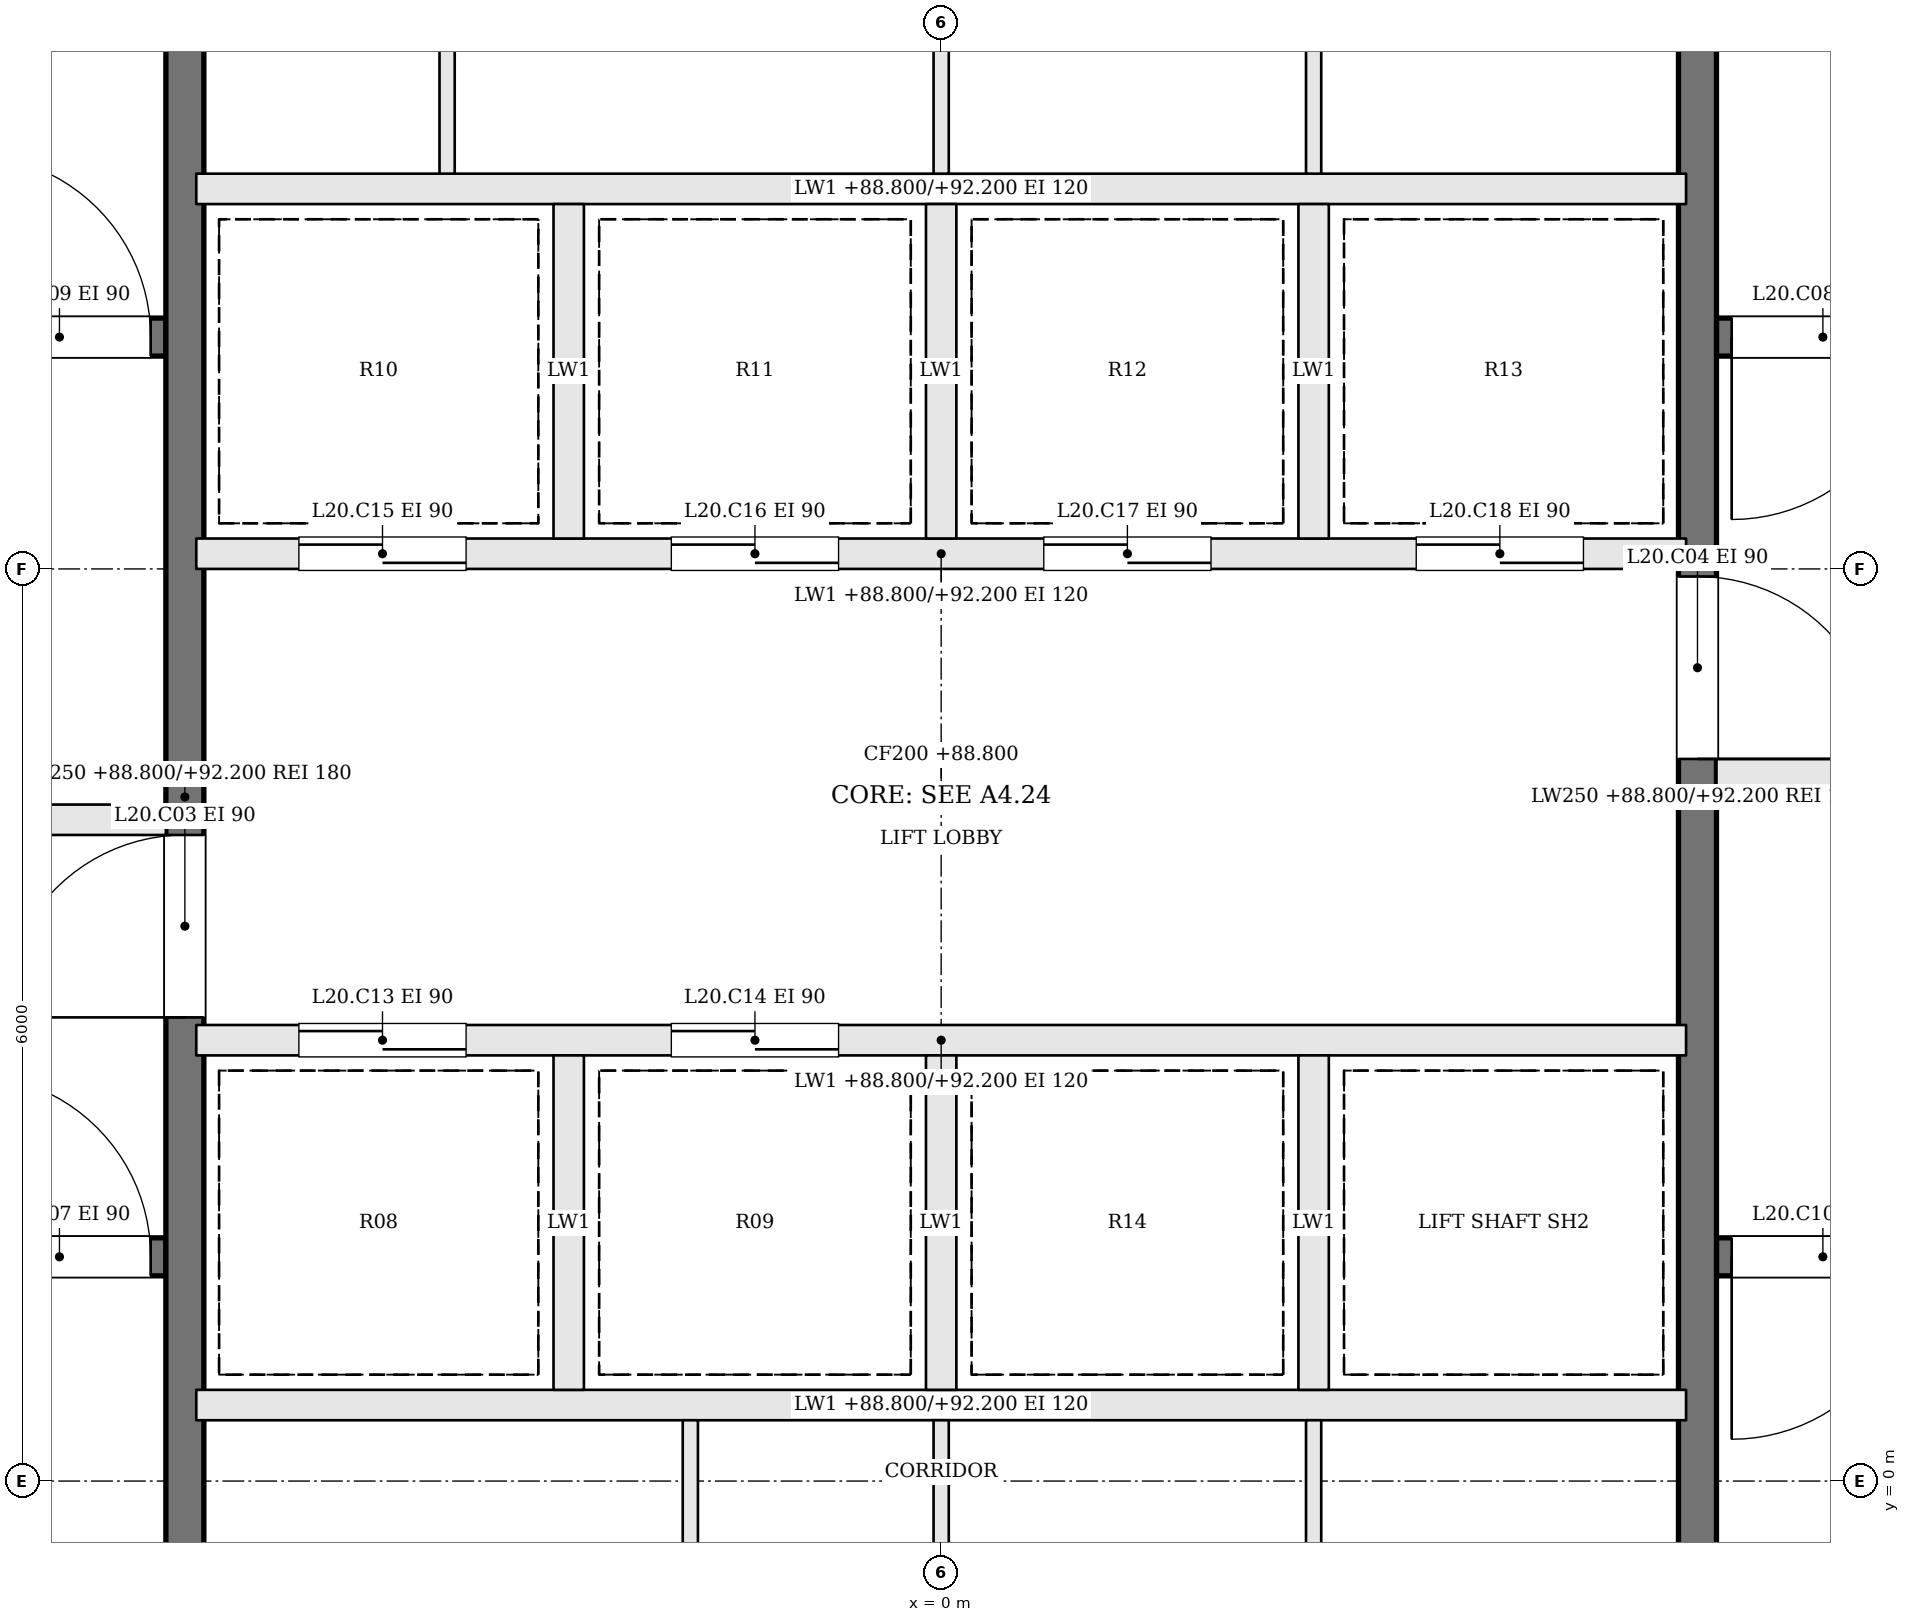
"""IFC4 building model, lengths in metres.
Left out: names, types, materials, properties, quantities, classifications, styles, units other than length and angle.
Written with IfcOpenShell. Run it as: python <this file> out.ifc"""

import sys

from ifc_helpers import new_model, si_unit, direction, frame, frame_2d, origin, place, context, subcontext, project, spatial, rectangle, extrude, element, fill, save


model = new_model("IFC4")
c1 = context("Model", 3, precision=1e-05, world=origin(), true_north=direction((0.0, 1.0)))
c2 = subcontext(c1, "Body", "Model", "MODEL_VIEW")
j1 = project(units=[si_unit("LENGTHUNIT", "METRE"), si_unit("PLANEANGLEUNIT", "RADIAN")], contexts=[c1])
p1 = place(None, origin())
s1 = spatial("IfcSite", under=j1, at=p1, CompositionType="ELEMENT")
p2 = place(p1, origin())
s2 = spatial("IfcBuilding", under=s1, at=p2, CompositionType="ELEMENT")
p3 = place(p2, frame((0.0, 0.0, 88.8)))
s3 = spatial("IfcBuildingStorey", under=s2, at=p3, CompositionType="ELEMENT", Elevation=88.8)
p4 = place(p3, frame((-11.9, 1.475, 0.0), z_axis=(0.0, 0.0, 1.0), x_axis=(1.0, 0.0, 0.0)))
e1 = element("IfcWall", 1, at=p4, inside=s3, PredefinedType="SOLIDWALL", context=c2, shape_type="SweptSolid", body=[
    extrude(rectangle(XDim=6.8, YDim=0.25, at=frame_2d((3.4, 0.0))), origin(), (0.0, 0.0, 1.0), 3.4),
])
p5 = place(p4, frame((5.5, 0.0, 0.0)))
e2 = element("IfcOpeningElement", 2, at=p5, cuts=e1, PredefinedType="OPENING", context=c2, shape_type="SweptSolid", body=[
    extrude(rectangle(XDim=1.2, YDim=2.1, at=frame_2d((0.6, 1.05))), frame((0.0, 0.135, 0.0), z_axis=(0.0, -1.0, 0.0), x_axis=(1.0, 0.0, 0.0)), (0.0, 0.0, 1.0), 0.27),
])
p6 = place(p3, frame((11.9, 7.525, 0.0), z_axis=(0.0, 0.0, 1.0), x_axis=(-1.0, 0.0, 0.0)))
e3 = element("IfcWall", 3, at=p6, inside=s3, PredefinedType="SOLIDWALL", context=c2, shape_type="SweptSolid", body=[
    extrude(rectangle(XDim=6.8, YDim=0.25, at=frame_2d((3.4, 0.0))), origin(), (0.0, 0.0, 1.0), 3.4),
])
p7 = place(p6, frame((5.5, 0.0, 0.0)))
e4 = element("IfcOpeningElement", 4, at=p7, cuts=e3, PredefinedType="OPENING", context=c2, shape_type="SweptSolid", body=[
    extrude(rectangle(XDim=1.2, YDim=2.1, at=frame_2d((0.6, 1.05))), frame((0.0, 0.135, 0.0), z_axis=(0.0, -1.0, 0.0), x_axis=(1.0, 0.0, 0.0)), (0.0, 0.0, 1.0), 0.27),
])
p8 = place(p3, frame((-11.9, 4.35, 0.0), z_axis=(0.0, 0.0, 1.0), x_axis=(1.0, 0.0, 0.0)))
e5 = element("IfcWall", 5, at=p8, inside=s3, PredefinedType="SOLIDWALL", context=c2, shape_type="SweptSolid", body=[
    extrude(rectangle(XDim=6.8, YDim=0.2, at=frame_2d((3.4, 0.0))), origin(), (0.0, 0.0, 1.0), 3.4),
])
p9 = place(p8, frame((4.1, 0.0, 0.0)))
e6 = element("IfcOpeningElement", 6, at=p9, cuts=e5, PredefinedType="OPENING", context=c2, shape_type="SweptSolid", body=[
    extrude(rectangle(XDim=1.2, YDim=2.1, at=frame_2d((0.6, 1.05))), frame((0.0, 0.11, 0.0), z_axis=(0.0, -1.0, 0.0), x_axis=(1.0, 0.0, 0.0)), (0.0, 0.0, 1.0), 0.22),
])
p10 = place(p8, frame((0.8, 0.0, 0.0)))
e7 = element("IfcOpeningElement", 7, at=p10, cuts=e5, PredefinedType="OPENING", context=c2, shape_type="SweptSolid", body=[
    extrude(rectangle(XDim=1.2, YDim=2.1, at=frame_2d((0.6, 1.05))), frame((0.0, 0.11, 0.0), z_axis=(0.0, -1.0, 0.0), x_axis=(1.0, 0.0, 0.0)), (0.0, 0.0, 1.0), 0.22),
])
p11 = place(p3, frame((11.9, 4.65, 0.0), z_axis=(0.0, 0.0, 1.0), x_axis=(-1.0, 0.0, 0.0)))
e8 = element("IfcWall", 8, at=p11, inside=s3, PredefinedType="SOLIDWALL", context=c2, shape_type="SweptSolid", body=[
    extrude(rectangle(XDim=6.8, YDim=0.2, at=frame_2d((3.4, 0.0))), origin(), (0.0, 0.0, 1.0), 3.4),
])
p12 = place(p11, frame((4.1, 0.0, 0.0)))
e9 = element("IfcOpeningElement", 9, at=p12, cuts=e8, PredefinedType="OPENING", context=c2, shape_type="SweptSolid", body=[
    extrude(rectangle(XDim=1.2, YDim=2.1, at=frame_2d((0.6, 1.05))), frame((0.0, 0.11, 0.0), z_axis=(0.0, -1.0, 0.0), x_axis=(1.0, 0.0, 0.0)), (0.0, 0.0, 1.0), 0.22),
])
p13 = place(p11, frame((0.8, 0.0, 0.0)))
e10 = element("IfcOpeningElement", 10, at=p13, cuts=e8, PredefinedType="OPENING", context=c2, shape_type="SweptSolid", body=[
    extrude(rectangle(XDim=1.2, YDim=2.1, at=frame_2d((0.6, 1.05))), frame((0.0, 0.11, 0.0), z_axis=(0.0, -1.0, 0.0), x_axis=(1.0, 0.0, 0.0)), (0.0, 0.0, 1.0), 0.22),
])
p14 = place(p3, frame((-11.9, 7.525, 0.0), z_axis=(0.0, 0.0, 1.0), x_axis=(1.0, 0.0, 0.0)))
e11 = element("IfcWall", 11, at=p14, inside=s3, PredefinedType="SOLIDWALL", context=c2, shape_type="SweptSolid", body=[
    extrude(rectangle(XDim=6.8, YDim=0.25, at=frame_2d((3.4, 0.0))), origin(), (0.0, 0.0, 1.0), 3.4),
])
p15 = place(p14, frame((5.5, 0.0, 0.0)))
e12 = element("IfcOpeningElement", 12, at=p15, cuts=e11, PredefinedType="OPENING", context=c2, shape_type="SweptSolid", body=[
    extrude(rectangle(XDim=1.2, YDim=2.1, at=frame_2d((0.6, 1.05))), frame((0.0, 0.135, 0.0), z_axis=(0.0, -1.0, 0.0), x_axis=(1.0, 0.0, 0.0)), (0.0, 0.0, 1.0), 0.27),
])
p16 = place(p3, frame((11.9, 1.475, 0.0), z_axis=(0.0, 0.0, 1.0), x_axis=(-1.0, 0.0, 0.0)))
e13 = element("IfcWall", 13, at=p16, inside=s3, PredefinedType="SOLIDWALL", context=c2, shape_type="SweptSolid", body=[
    extrude(rectangle(XDim=6.8, YDim=0.25, at=frame_2d((3.4, 0.0))), origin(), (0.0, 0.0, 1.0), 3.4),
])
p17 = place(p16, frame((5.5, 0.0, 0.0)))
e14 = element("IfcOpeningElement", 14, at=p17, cuts=e13, PredefinedType="OPENING", context=c2, shape_type="SweptSolid", body=[
    extrude(rectangle(XDim=1.2, YDim=2.1, at=frame_2d((0.6, 1.05))), frame((0.0, 0.135, 0.0), z_axis=(0.0, -1.0, 0.0), x_axis=(1.0, 0.0, 0.0)), (0.0, 0.0, 1.0), 0.27),
])
p18 = place(p3, frame((-4.975, -1.9, 0.0), z_axis=(0.0, 0.0, 1.0), x_axis=(0.0, 1.0, 0.0)))
e15 = element("IfcWall", 15, at=p18, inside=s3, PredefinedType="SOLIDWALL", context=c2, shape_type="SweptSolid", body=[
    extrude(rectangle(XDim=12.8, YDim=0.25, at=frame_2d((6.4, 0.0))), origin(), (0.0, 0.0, 1.0), 3.4),
])
p19 = place(p18, frame((4.95, 0.0, 0.0)))
e16 = element("IfcOpeningElement", 16, at=p19, cuts=e15, PredefinedType="OPENING", context=c2, shape_type="SweptSolid", body=[
    extrude(rectangle(XDim=1.2, YDim=2.1, at=frame_2d((0.6, 1.05))), frame((0.0, 0.135, 0.0), z_axis=(0.0, -1.0, 0.0), x_axis=(1.0, 0.0, 0.0)), (0.0, 0.0, 1.0), 0.27),
])
p20 = place(p3, frame((4.975, 10.9, 0.0), z_axis=(0.0, 0.0, 1.0), x_axis=(0.0, -1.0, 0.0)))
e17 = element("IfcWall", 17, at=p20, inside=s3, PredefinedType="SOLIDWALL", context=c2, shape_type="SweptSolid", body=[
    extrude(rectangle(XDim=12.8, YDim=0.25, at=frame_2d((6.4, 0.0))), origin(), (0.0, 0.0, 1.0), 3.4),
])
p21 = place(p20, frame((4.95, 0.0, 0.0)))
e18 = element("IfcOpeningElement", 18, at=p21, cuts=e17, PredefinedType="OPENING", context=c2, shape_type="SweptSolid", body=[
    extrude(rectangle(XDim=1.2, YDim=2.1, at=frame_2d((0.6, 1.05))), frame((0.0, 0.135, 0.0), z_axis=(0.0, -1.0, 0.0), x_axis=(1.0, 0.0, 0.0)), (0.0, 0.0, 1.0), 0.27),
])
p22 = place(p3, frame((-4.9, 0.5, 0.0), z_axis=(0.0, 0.0, 1.0), x_axis=(1.0, 0.0, 0.0)))
e19 = element("IfcWall", 19, at=p22, inside=s3, PredefinedType="SOLIDWALL", context=c2, shape_type="SweptSolid", body=[
    extrude(rectangle(XDim=9.8, YDim=0.2, at=frame_2d((4.9, 0.0))), origin(), (0.0, 0.0, 1.0), 3.4),
])
p23 = place(p3, frame((-4.9, 2.9, 0.0), z_axis=(0.0, 0.0, 1.0), x_axis=(1.0, 0.0, 0.0)))
e20 = element("IfcWall", 20, at=p23, inside=s3, PredefinedType="SOLIDWALL", context=c2, shape_type="SweptSolid", body=[
    extrude(rectangle(XDim=9.8, YDim=0.2, at=frame_2d((4.9, 0.0))), origin(), (0.0, 0.0, 1.0), 3.4),
])
p24 = place(p23, frame((0.675, 0.0, 0.0)))
e21 = element("IfcOpeningElement", 21, at=p24, cuts=e20, PredefinedType="OPENING", context=c2, shape_type="SweptSolid", body=[
    extrude(rectangle(XDim=1.1, YDim=2.1, at=frame_2d((0.55, 1.05))), frame((0.0, 0.11, 0.0), z_axis=(0.0, -1.0, 0.0), x_axis=(1.0, 0.0, 0.0)), (0.0, 0.0, 1.0), 0.22),
])
p25 = place(p23, frame((3.125, 0.0, 0.0)))
e22 = element("IfcOpeningElement", 22, at=p25, cuts=e20, PredefinedType="OPENING", context=c2, shape_type="SweptSolid", body=[
    extrude(rectangle(XDim=1.1, YDim=2.1, at=frame_2d((0.55, 1.05))), frame((0.0, 0.11, 0.0), z_axis=(0.0, -1.0, 0.0), x_axis=(1.0, 0.0, 0.0)), (0.0, 0.0, 1.0), 0.22),
])
p26 = place(p3, frame((-4.9, 6.1, 0.0), z_axis=(0.0, 0.0, 1.0), x_axis=(1.0, 0.0, 0.0)))
e23 = element("IfcWall", 23, at=p26, inside=s3, PredefinedType="SOLIDWALL", context=c2, shape_type="SweptSolid", body=[
    extrude(rectangle(XDim=9.8, YDim=0.2, at=frame_2d((4.9, 0.0))), origin(), (0.0, 0.0, 1.0), 3.4),
])
p27 = place(p26, frame((0.675, 0.0, 0.0)))
e24 = element("IfcOpeningElement", 24, at=p27, cuts=e23, PredefinedType="OPENING", context=c2, shape_type="SweptSolid", body=[
    extrude(rectangle(XDim=1.1, YDim=2.1, at=frame_2d((0.55, 1.05))), frame((0.0, 0.11, 0.0), z_axis=(0.0, -1.0, 0.0), x_axis=(1.0, 0.0, 0.0)), (0.0, 0.0, 1.0), 0.22),
])
p28 = place(p26, frame((3.125, 0.0, 0.0)))
e25 = element("IfcOpeningElement", 25, at=p28, cuts=e23, PredefinedType="OPENING", context=c2, shape_type="SweptSolid", body=[
    extrude(rectangle(XDim=1.1, YDim=2.1, at=frame_2d((0.55, 1.05))), frame((0.0, 0.11, 0.0), z_axis=(0.0, -1.0, 0.0), x_axis=(1.0, 0.0, 0.0)), (0.0, 0.0, 1.0), 0.22),
])
p29 = place(p26, frame((5.575, 0.0, 0.0)))
e26 = element("IfcOpeningElement", 26, at=p29, cuts=e23, PredefinedType="OPENING", context=c2, shape_type="SweptSolid", body=[
    extrude(rectangle(XDim=1.1, YDim=2.1, at=frame_2d((0.55, 1.05))), frame((0.0, 0.11, 0.0), z_axis=(0.0, -1.0, 0.0), x_axis=(1.0, 0.0, 0.0)), (0.0, 0.0, 1.0), 0.22),
])
p30 = place(p26, frame((8.025, 0.0, 0.0)))
e27 = element("IfcOpeningElement", 27, at=p30, cuts=e23, PredefinedType="OPENING", context=c2, shape_type="SweptSolid", body=[
    extrude(rectangle(XDim=1.1, YDim=2.1, at=frame_2d((0.55, 1.05))), frame((0.0, 0.11, 0.0), z_axis=(0.0, -1.0, 0.0), x_axis=(1.0, 0.0, 0.0)), (0.0, 0.0, 1.0), 0.22),
])
p31 = place(p3, frame((-4.9, 8.5, 0.0), z_axis=(0.0, 0.0, 1.0), x_axis=(1.0, 0.0, 0.0)))
e28 = element("IfcWall", 28, at=p31, inside=s3, PredefinedType="SOLIDWALL", context=c2, shape_type="SweptSolid", body=[
    extrude(rectangle(XDim=9.8, YDim=0.2, at=frame_2d((4.9, 0.0))), origin(), (0.0, 0.0, 1.0), 3.4),
])
for number, where, z_axis, x_axis in (
    (29, (-2.45, 0.6, 0.0), (0.0, 0.0, 1.0), (0.0, 1.0, 0.0)),
    (30, (0.0, 0.6, 0.0), (0.0, 0.0, 1.0), (0.0, 1.0, 0.0)),
    (31, (2.45, 0.6, 0.0), (0.0, 0.0, 1.0), (0.0, 1.0, 0.0)),
    (32, (-2.45, 6.2, 0.0), (0.0, 0.0, 1.0), (0.0, 1.0, 0.0)),
    (33, (0.0, 6.2, 0.0), (0.0, 0.0, 1.0), (0.0, 1.0, 0.0)),
    (34, (2.45, 6.2, 0.0), (0.0, 0.0, 1.0), (0.0, 1.0, 0.0)),
):
    element("IfcWall", number, at=place(p3, frame(where, z_axis=z_axis, x_axis=x_axis)), inside=s3, PredefinedType="SOLIDWALL", context=c2, shape_type="SweptSolid", body=[
        extrude(rectangle(XDim=2.2, YDim=0.2, at=frame_2d((1.1, 0.0))), origin(), (0.0, 0.0, 1.0), 3.4),
    ])
for number, where, z_axis, x_axis in (
    (35, (-1.65, -1.9, 0.0), (0.0, 0.0, 1.0), (0.0, 1.0, 0.0)),
    (36, (0.0, -1.9, 0.0), (0.0, 0.0, 1.0), (0.0, 1.0, 0.0)),
    (37, (2.45, -1.9, 0.0), (0.0, 0.0, 1.0), (0.0, 1.0, 0.0)),
    (38, (-3.25, 8.6, 0.0), (0.0, 0.0, 1.0), (0.0, 1.0, 0.0)),
    (39, (0.0, 8.6, 0.0), (0.0, 0.0, 1.0), (0.0, 1.0, 0.0)),
    (40, (2.45, 8.6, 0.0), (0.0, 0.0, 1.0), (0.0, 1.0, 0.0)),
):
    element("IfcWall", number, at=place(p3, frame(where, z_axis=z_axis, x_axis=x_axis)), inside=s3, PredefinedType="PARTITIONING", context=c2, shape_type="SweptSolid", body=[
        extrude(rectangle(XDim=2.3, YDim=0.1, at=frame_2d((1.15, 0.0))), origin(), (0.0, 0.0, 1.0), 3.4),
    ])
p32 = place(p19, origin())
e41 = element("IfcDoor", 41, at=p32, inside=s3, OperationType="SINGLE_SWING_LEFT", PredefinedType="DOOR", context=c2, shape_type="SweptSolid", body=[
    extrude(rectangle(XDim=1.2, YDim=2.1, at=frame_2d((0.6, 1.05))), frame((0.0, 0.025, 0.0), z_axis=(0.0, -1.0, 0.0), x_axis=(1.0, 0.0, 0.0)), (0.0, 0.0, 1.0), 0.05),
])
fill(e16, e41)
p33 = place(p21, origin())
e42 = element("IfcDoor", 42, at=p33, inside=s3, OperationType="SINGLE_SWING_RIGHT", PredefinedType="DOOR", context=c2, shape_type="SweptSolid", body=[
    extrude(rectangle(XDim=1.2, YDim=2.1, at=frame_2d((0.6, 1.05))), frame((0.0, 0.025, 0.0), z_axis=(0.0, -1.0, 0.0), x_axis=(1.0, 0.0, 0.0)), (0.0, 0.0, 1.0), 0.05),
])
fill(e18, e42)
p34 = place(p5, origin())
e43 = element("IfcDoor", 43, at=p34, inside=s3, OperationType="SINGLE_SWING_LEFT", PredefinedType="DOOR", context=c2, shape_type="SweptSolid", body=[
    extrude(rectangle(XDim=1.2, YDim=2.1, at=frame_2d((0.6, 1.05))), frame((0.0, 0.025, 0.0), z_axis=(0.0, -1.0, 0.0), x_axis=(1.0, 0.0, 0.0)), (0.0, 0.0, 1.0), 0.05),
])
fill(e2, e43)
p35 = place(p7, origin())
e44 = element("IfcDoor", 44, at=p35, inside=s3, OperationType="SINGLE_SWING_RIGHT", PredefinedType="DOOR", context=c2, shape_type="SweptSolid", body=[
    extrude(rectangle(XDim=1.2, YDim=2.1, at=frame_2d((0.6, 1.05))), frame((0.0, 0.025, 0.0), z_axis=(0.0, -1.0, 0.0), x_axis=(1.0, 0.0, 0.0)), (0.0, 0.0, 1.0), 0.05),
])
fill(e4, e44)
p36 = place(p15, origin())
e45 = element("IfcDoor", 45, at=p36, inside=s3, OperationType="SINGLE_SWING_LEFT", PredefinedType="DOOR", context=c2, shape_type="SweptSolid", body=[
    extrude(rectangle(XDim=1.2, YDim=2.1, at=frame_2d((0.6, 1.05))), frame((0.0, 0.025, 0.0), z_axis=(0.0, -1.0, 0.0), x_axis=(1.0, 0.0, 0.0)), (0.0, 0.0, 1.0), 0.05),
])
fill(e12, e45)
p37 = place(p17, origin())
e46 = element("IfcDoor", 46, at=p37, inside=s3, OperationType="SINGLE_SWING_RIGHT", PredefinedType="DOOR", context=c2, shape_type="SweptSolid", body=[
    extrude(rectangle(XDim=1.2, YDim=2.1, at=frame_2d((0.6, 1.05))), frame((0.0, 0.025, 0.0), z_axis=(0.0, -1.0, 0.0), x_axis=(1.0, 0.0, 0.0)), (0.0, 0.0, 1.0), 0.05),
])
fill(e14, e46)
p38 = place(p24, origin())
e47 = element("IfcDoor", 47, at=p38, inside=s3, OperationType="SLIDING_TO_RIGHT", PredefinedType="DOOR", context=c2, shape_type="SweptSolid", body=[
    extrude(rectangle(XDim=1.1, YDim=2.1, at=frame_2d((0.55, 1.05))), frame((0.0, 0.025, 0.0), z_axis=(0.0, -1.0, 0.0), x_axis=(1.0, 0.0, 0.0)), (0.0, 0.0, 1.0), 0.05),
])
fill(e21, e47)
p39 = place(p25, origin())
e48 = element("IfcDoor", 48, at=p39, inside=s3, OperationType="SLIDING_TO_LEFT", PredefinedType="DOOR", context=c2, shape_type="SweptSolid", body=[
    extrude(rectangle(XDim=1.1, YDim=2.1, at=frame_2d((0.55, 1.05))), frame((0.0, 0.025, 0.0), z_axis=(0.0, -1.0, 0.0), x_axis=(1.0, 0.0, 0.0)), (0.0, 0.0, 1.0), 0.05),
])
fill(e22, e48)
p40 = place(p27, origin())
e49 = element("IfcDoor", 49, at=p40, inside=s3, OperationType="SLIDING_TO_RIGHT", PredefinedType="DOOR", context=c2, shape_type="SweptSolid", body=[
    extrude(rectangle(XDim=1.1, YDim=2.1, at=frame_2d((0.55, 1.05))), frame((0.0, 0.025, 0.0), z_axis=(0.0, -1.0, 0.0), x_axis=(1.0, 0.0, 0.0)), (0.0, 0.0, 1.0), 0.05),
])
fill(e24, e49)
p41 = place(p28, origin())
e50 = element("IfcDoor", 50, at=p41, inside=s3, OperationType="SLIDING_TO_LEFT", PredefinedType="DOOR", context=c2, shape_type="SweptSolid", body=[
    extrude(rectangle(XDim=1.1, YDim=2.1, at=frame_2d((0.55, 1.05))), frame((0.0, 0.025, 0.0), z_axis=(0.0, -1.0, 0.0), x_axis=(1.0, 0.0, 0.0)), (0.0, 0.0, 1.0), 0.05),
])
fill(e25, e50)
p42 = place(p29, origin())
e51 = element("IfcDoor", 51, at=p42, inside=s3, OperationType="SLIDING_TO_RIGHT", PredefinedType="DOOR", context=c2, shape_type="SweptSolid", body=[
    extrude(rectangle(XDim=1.1, YDim=2.1, at=frame_2d((0.55, 1.05))), frame((0.0, 0.025, 0.0), z_axis=(0.0, -1.0, 0.0), x_axis=(1.0, 0.0, 0.0)), (0.0, 0.0, 1.0), 0.05),
])
fill(e26, e51)
p43 = place(p30, origin())
e52 = element("IfcDoor", 52, at=p43, inside=s3, OperationType="SLIDING_TO_LEFT", PredefinedType="DOOR", context=c2, shape_type="SweptSolid", body=[
    extrude(rectangle(XDim=1.1, YDim=2.1, at=frame_2d((0.55, 1.05))), frame((0.0, 0.025, 0.0), z_axis=(0.0, -1.0, 0.0), x_axis=(1.0, 0.0, 0.0)), (0.0, 0.0, 1.0), 0.05),
])
fill(e27, e52)
save(model, sys.argv[1])
